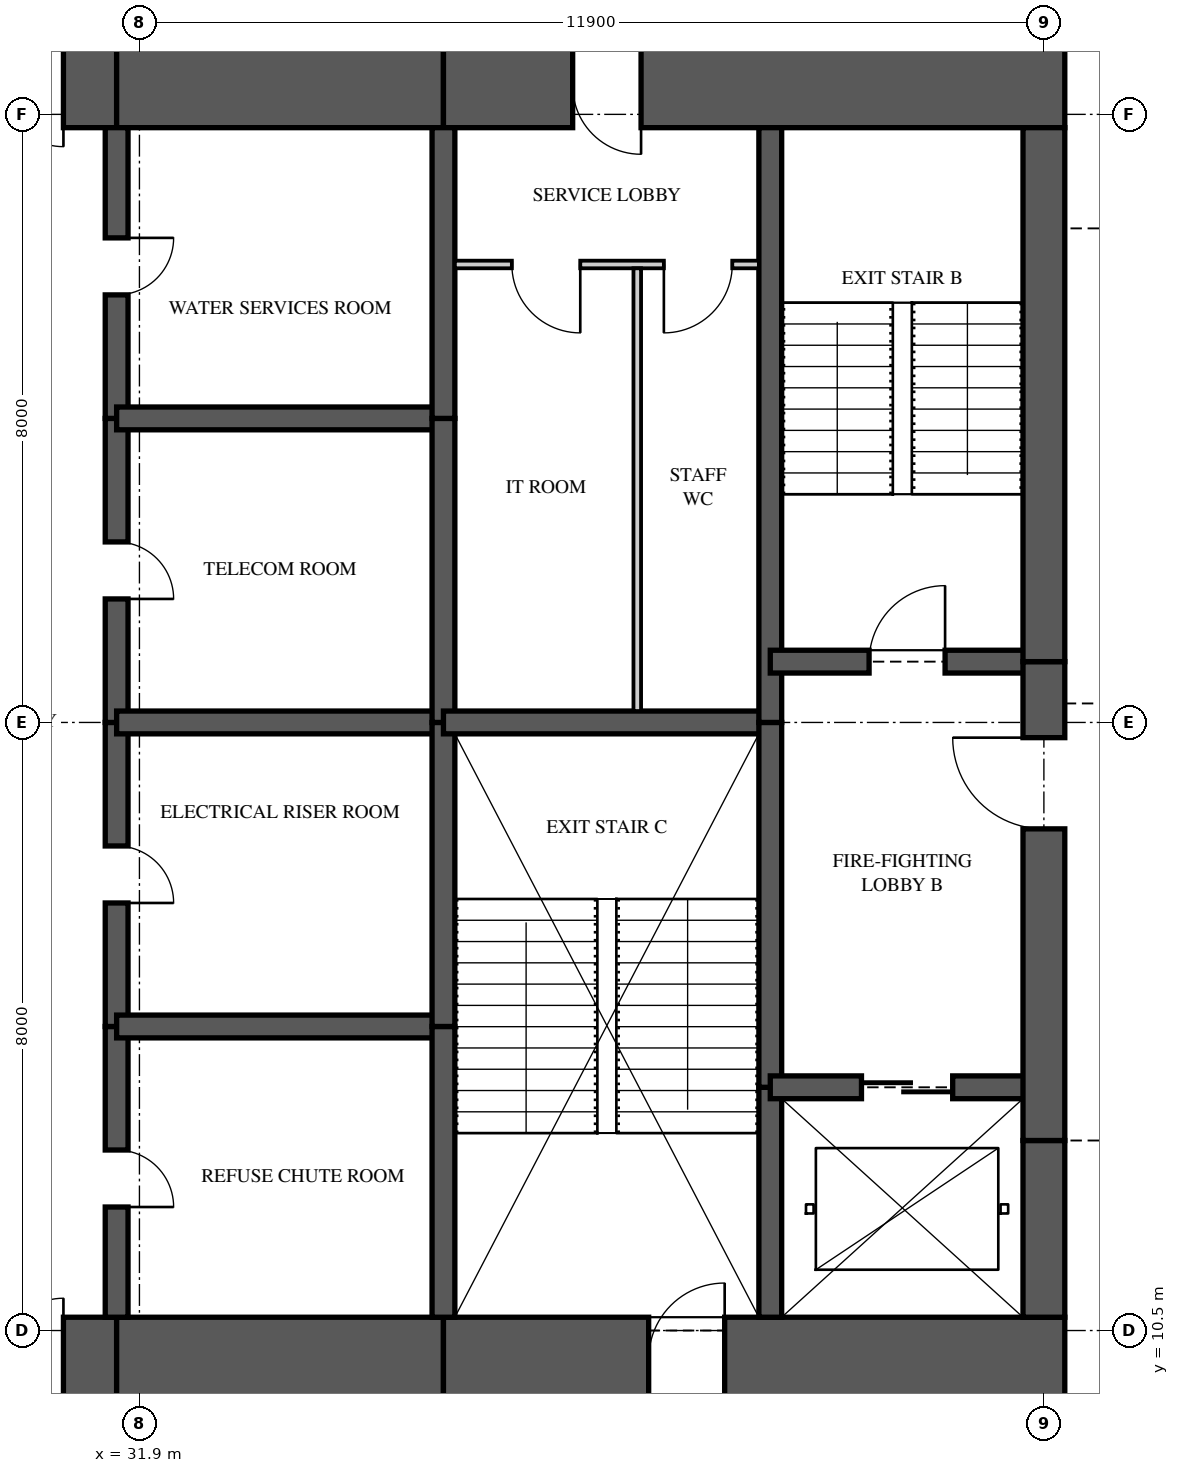
"""IFC4 building model, lengths in metres.
Left out: names, types, materials, properties, quantities, classifications, styles, units other than length and angle.
Written with IfcOpenShell. Run it as: python <this file> out.ifc"""

import sys

from ifc_helpers import new_model, si_unit, direction, frame, frame_2d, origin, place, context, subcontext, project, spatial, rectangle, extrude, element, fill, save


model = new_model("IFC4")
c1 = context("Model", 3, precision=1e-05, world=origin(), true_north=direction((0.0, 1.0)))
c2 = subcontext(c1, "Body", "Model", "MODEL_VIEW")
j1 = project(units=[si_unit("LENGTHUNIT", "METRE"), si_unit("PLANEANGLEUNIT", "RADIAN")], contexts=[c1])
p1 = place(None, origin())
s1 = spatial("IfcSite", under=j1, at=p1, CompositionType="ELEMENT")
p2 = place(p1, origin())
s2 = spatial("IfcBuilding", under=s1, at=p2, CompositionType="ELEMENT")
p3 = place(p2, frame((0.0, 0.0, 252.95)))
s3 = spatial("IfcBuildingStorey", under=s2, at=p3, CompositionType="ELEMENT", Elevation=252.95)
p4 = place(p3, frame((26.0, 10.125, 0.0), z_axis=(0.0, 0.0, 1.0), x_axis=(1.0, 0.0, 0.0)))
e1 = element("IfcWall", 1, at=p4, inside=s3, PredefinedType="SHEAR", context=c2, shape_type="SweptSolid", body=[
    extrude(rectangle(XDim=5.6, YDim=1.1, at=frame_2d((2.8, 0.0))), origin(), (0.0, 0.0, 1.0), 3.5),
])
p5 = place(p4, frame((3.3, 0.0, 0.0)))
e2 = element("IfcOpeningElement", 2, at=p5, cuts=e1, PredefinedType="OPENING", context=c2, shape_type="SweptSolid", body=[
    extrude(rectangle(XDim=1.6, YDim=2.1, at=frame_2d((0.8, 1.05))), frame((0.0, 0.56, 0.0), z_axis=(0.0, -1.0, 0.0), x_axis=(1.0, 0.0, 0.0)), (0.0, 0.0, 1.0), 1.12),
])
p6 = place(p3, frame((31.6, 10.125, 0.0), z_axis=(0.0, 0.0, 1.0), x_axis=(1.0, 0.0, 0.0)))
e3 = element("IfcWall", 3, at=p6, inside=s3, PredefinedType="SHEAR", context=c2, shape_type="SweptSolid", body=[
    extrude(rectangle(XDim=4.3, YDim=1.1, at=frame_2d((2.15, 0.0))), origin(), (0.0, 0.0, 1.0), 3.5),
])
p7 = place(p3, frame((35.9, 10.125, 0.0), z_axis=(0.0, 0.0, 1.0), x_axis=(1.0, 0.0, 0.0)))
e4 = element("IfcWall", 4, at=p7, inside=s3, PredefinedType="SHEAR", context=c2, shape_type="SweptSolid", body=[
    extrude(rectangle(XDim=8.175, YDim=1.1, at=frame_2d((4.087, 0.0))), origin(), (0.0, 0.0, 1.0), 3.5),
])
p8 = place(p7, frame((2.7, 0.0, 0.0)))
e5 = element("IfcOpeningElement", 5, at=p8, cuts=e4, PredefinedType="OPENING", context=c2, shape_type="SweptSolid", body=[
    extrude(rectangle(XDim=1.0, YDim=2.1, at=frame_2d((0.5, 1.05))), frame((0.0, 0.56, 0.0), z_axis=(0.0, -1.0, 0.0), x_axis=(1.0, 0.0, 0.0)), (0.0, 0.0, 1.0), 1.12),
])
p9 = place(p3, frame((44.075, 26.875, 0.0), z_axis=(0.0, 0.0, 1.0), x_axis=(-1.0, 0.0, 0.0)))
e6 = element("IfcWall", 6, at=p9, inside=s3, PredefinedType="SHEAR", context=c2, shape_type="SweptSolid", body=[
    extrude(rectangle(XDim=8.175, YDim=1.1, at=frame_2d((4.087, 0.0))), origin(), (0.0, 0.0, 1.0), 3.5),
])
p10 = place(p9, frame((5.575, 0.0, 0.0)))
e7 = element("IfcOpeningElement", 7, at=p10, cuts=e6, PredefinedType="OPENING", context=c2, shape_type="SweptSolid", body=[
    extrude(rectangle(XDim=0.9, YDim=2.1, at=frame_2d((0.45, 1.05))), frame((0.0, 0.56, 0.0), z_axis=(0.0, -1.0, 0.0), x_axis=(1.0, 0.0, 0.0)), (0.0, 0.0, 1.0), 1.12),
])
p11 = place(p3, frame((35.9, 26.875, 0.0), z_axis=(0.0, 0.0, 1.0), x_axis=(-1.0, 0.0, 0.0)))
e8 = element("IfcWall", 8, at=p11, inside=s3, PredefinedType="SHEAR", context=c2, shape_type="SweptSolid", body=[
    extrude(rectangle(XDim=4.3, YDim=1.1, at=frame_2d((2.15, 0.0))), origin(), (0.0, 0.0, 1.0), 3.5),
])
p12 = place(p3, frame((31.6, 26.875, 0.0), z_axis=(0.0, 0.0, 1.0), x_axis=(-1.0, 0.0, 0.0)))
e9 = element("IfcWall", 9, at=p12, inside=s3, PredefinedType="SHEAR", context=c2, shape_type="SweptSolid", body=[
    extrude(rectangle(XDim=5.6, YDim=1.1, at=frame_2d((2.8, 0.0))), origin(), (0.0, 0.0, 1.0), 3.5),
])
p13 = place(p12, frame((0.7, 0.0, 0.0)))
e10 = element("IfcOpeningElement", 10, at=p13, cuts=e9, PredefinedType="OPENING", context=c2, shape_type="SweptSolid", body=[
    extrude(rectangle(XDim=1.6, YDim=2.1, at=frame_2d((0.8, 1.05))), frame((0.0, 0.56, 0.0), z_axis=(0.0, -1.0, 0.0), x_axis=(1.0, 0.0, 0.0)), (0.0, 0.0, 1.0), 1.12),
])
p14 = place(p3, frame((43.8, 10.675, 0.0), z_axis=(0.0, 0.0, 1.0), x_axis=(0.0, 1.0, 0.0)))
e11 = element("IfcWall", 11, at=p14, inside=s3, PredefinedType="SHEAR", context=c2, shape_type="SweptSolid", body=[
    extrude(rectangle(XDim=2.325, YDim=0.55, at=frame_2d((1.163, 0.0))), origin(), (0.0, 0.0, 1.0), 3.5),
])
p15 = place(p3, frame((43.8, 13.0, 0.0), z_axis=(0.0, 0.0, 1.0), x_axis=(0.0, 1.0, 0.0)))
e12 = element("IfcWall", 12, at=p15, inside=s3, PredefinedType="SHEAR", context=c2, shape_type="SweptSolid", body=[
    extrude(rectangle(XDim=6.3, YDim=0.55, at=frame_2d((3.15, 0.0))), origin(), (0.0, 0.0, 1.0), 3.5),
])
p16 = place(p15, frame((4.1, 0.0, 0.0)))
e13 = element("IfcOpeningElement", 13, at=p16, cuts=e12, PredefinedType="OPENING", context=c2, shape_type="SweptSolid", body=[
    extrude(rectangle(XDim=1.2, YDim=2.2, at=frame_2d((0.6, 1.1))), frame((0.0, 0.285, 0.0), z_axis=(0.0, -1.0, 0.0), x_axis=(1.0, 0.0, 0.0)), (0.0, 0.0, 1.0), 0.57),
])
p17 = place(p3, frame((43.8, 19.3, 0.0), z_axis=(0.0, 0.0, 1.0), x_axis=(0.0, 1.0, 0.0)))
e14 = element("IfcWall", 14, at=p17, inside=s3, PredefinedType="SHEAR", context=c2, shape_type="SweptSolid", body=[
    extrude(rectangle(XDim=7.025, YDim=0.55, at=frame_2d((3.512, 0.0))), origin(), (0.0, 0.0, 1.0), 3.5),
])
p18 = place(p3, frame((31.6, 10.675, 0.0), z_axis=(0.0, 0.0, 1.0), x_axis=(0.0, 1.0, 0.0)))
e15 = element("IfcWall", 15, at=p18, inside=s3, PredefinedType="SHEAR", context=c2, shape_type="SweptSolid", body=[
    extrude(rectangle(XDim=3.825, YDim=0.3, at=frame_2d((1.913, 0.0))), origin(), (0.0, 0.0, 1.0), 3.5),
])
p19 = place(p18, frame((1.45, 0.0, 0.0)))
e16 = element("IfcOpeningElement", 16, at=p19, cuts=e15, PredefinedType="OPENING", context=c2, shape_type="SweptSolid", body=[
    extrude(rectangle(XDim=0.75, YDim=2.1, at=frame_2d((0.375, 1.05))), frame((0.0, 0.16, 0.0), z_axis=(0.0, -1.0, 0.0), x_axis=(1.0, 0.0, 0.0)), (0.0, 0.0, 1.0), 0.32),
])
p20 = place(p3, frame((31.6, 14.5, 0.0), z_axis=(0.0, 0.0, 1.0), x_axis=(0.0, 1.0, 0.0)))
e17 = element("IfcWall", 17, at=p20, inside=s3, PredefinedType="SHEAR", context=c2, shape_type="SweptSolid", body=[
    extrude(rectangle(XDim=4.0, YDim=0.3, at=frame_2d((2.0, 0.0))), origin(), (0.0, 0.0, 1.0), 3.5),
])
p21 = place(p20, frame((1.625, 0.0, 0.0)))
e18 = element("IfcOpeningElement", 18, at=p21, cuts=e17, PredefinedType="OPENING", context=c2, shape_type="SweptSolid", body=[
    extrude(rectangle(XDim=0.75, YDim=2.1, at=frame_2d((0.375, 1.05))), frame((0.0, 0.16, 0.0), z_axis=(0.0, -1.0, 0.0), x_axis=(1.0, 0.0, 0.0)), (0.0, 0.0, 1.0), 0.32),
])
p22 = place(p3, frame((31.6, 18.5, 0.0), z_axis=(0.0, 0.0, 1.0), x_axis=(0.0, 1.0, 0.0)))
e19 = element("IfcWall", 19, at=p22, inside=s3, PredefinedType="SHEAR", context=c2, shape_type="SweptSolid", body=[
    extrude(rectangle(XDim=4.0, YDim=0.3, at=frame_2d((2.0, 0.0))), origin(), (0.0, 0.0, 1.0), 3.5),
])
p23 = place(p22, frame((1.625, 0.0, 0.0)))
e20 = element("IfcOpeningElement", 20, at=p23, cuts=e19, PredefinedType="OPENING", context=c2, shape_type="SweptSolid", body=[
    extrude(rectangle(XDim=0.75, YDim=2.1, at=frame_2d((0.375, 1.05))), frame((0.0, 0.16, 0.0), z_axis=(0.0, -1.0, 0.0), x_axis=(1.0, 0.0, 0.0)), (0.0, 0.0, 1.0), 0.32),
])
p24 = place(p3, frame((31.6, 22.5, 0.0), z_axis=(0.0, 0.0, 1.0), x_axis=(0.0, 1.0, 0.0)))
e21 = element("IfcWall", 21, at=p24, inside=s3, PredefinedType="SHEAR", context=c2, shape_type="SweptSolid", body=[
    extrude(rectangle(XDim=3.825, YDim=0.3, at=frame_2d((1.913, 0.0))), origin(), (0.0, 0.0, 1.0), 3.5),
])
p25 = place(p24, frame((1.625, 0.0, 0.0)))
e22 = element("IfcOpeningElement", 22, at=p25, cuts=e21, PredefinedType="OPENING", context=c2, shape_type="SweptSolid", body=[
    extrude(rectangle(XDim=0.75, YDim=2.1, at=frame_2d((0.375, 1.05))), frame((0.0, 0.16, 0.0), z_axis=(0.0, -1.0, 0.0), x_axis=(1.0, 0.0, 0.0)), (0.0, 0.0, 1.0), 0.32),
])
p26 = place(p3, frame((35.9, 10.675, 0.0), z_axis=(0.0, 0.0, 1.0), x_axis=(0.0, 1.0, 0.0)))
e23 = element("IfcWall", 23, at=p26, inside=s3, PredefinedType="SHEAR", context=c2, shape_type="SweptSolid", body=[
    extrude(rectangle(XDim=3.825, YDim=0.3, at=frame_2d((1.913, 0.0))), origin(), (0.0, 0.0, 1.0), 3.5),
])
for number, where, z_axis, x_axis in (
    (24, (35.9, 14.5, 0.0), (0.0, 0.0, 1.0), (0.0, 1.0, 0.0)),
    (25, (35.9, 18.5, 0.0), (0.0, 0.0, 1.0), (0.0, 1.0, 0.0)),
):
    element("IfcWall", number, at=place(p3, frame(where, z_axis=z_axis, x_axis=x_axis)), inside=s3, PredefinedType="SHEAR", context=c2, shape_type="SweptSolid", body=[
        extrude(rectangle(XDim=4.0, YDim=0.3, at=frame_2d((2.0, 0.0))), origin(), (0.0, 0.0, 1.0), 3.5),
    ])
p27 = place(p3, frame((35.9, 22.5, 0.0), z_axis=(0.0, 0.0, 1.0), x_axis=(0.0, 1.0, 0.0)))
e26 = element("IfcWall", 26, at=p27, inside=s3, PredefinedType="SHEAR", context=c2, shape_type="SweptSolid", body=[
    extrude(rectangle(XDim=3.825, YDim=0.3, at=frame_2d((1.913, 0.0))), origin(), (0.0, 0.0, 1.0), 3.5),
])
p28 = place(p3, frame((40.2, 10.675, 0.0), z_axis=(0.0, 0.0, 1.0), x_axis=(0.0, 1.0, 0.0)))
e27 = element("IfcWall", 27, at=p28, inside=s3, PredefinedType="SHEAR", context=c2, shape_type="SweptSolid", body=[
    extrude(rectangle(XDim=3.025, YDim=0.3, at=frame_2d((1.512, 0.0))), origin(), (0.0, 0.0, 1.0), 3.5),
])
p29 = place(p3, frame((40.2, 13.7, 0.0), z_axis=(0.0, 0.0, 1.0), x_axis=(0.0, 1.0, 0.0)))
e28 = element("IfcWall", 28, at=p29, inside=s3, PredefinedType="SHEAR", context=c2, shape_type="SweptSolid", body=[
    extrude(rectangle(XDim=4.8, YDim=0.3, at=frame_2d((2.4, 0.0))), origin(), (0.0, 0.0, 1.0), 3.5),
])
p30 = place(p3, frame((40.2, 18.5, 0.0), z_axis=(0.0, 0.0, 1.0), x_axis=(0.0, 1.0, 0.0)))
e29 = element("IfcWall", 29, at=p30, inside=s3, PredefinedType="SHEAR", context=c2, shape_type="SweptSolid", body=[
    extrude(rectangle(XDim=7.825, YDim=0.3, at=frame_2d((3.913, 0.0))), origin(), (0.0, 0.0, 1.0), 3.5),
])
for number, where, z_axis, x_axis in (
    (30, (31.6, 14.5, 0.0), (0.0, 0.0, 1.0), (1.0, 0.0, 0.0)),
    (31, (31.6, 18.5, 0.0), (0.0, 0.0, 1.0), (1.0, 0.0, 0.0)),
    (32, (31.6, 22.5, 0.0), (0.0, 0.0, 1.0), (1.0, 0.0, 0.0)),
):
    element("IfcWall", number, at=place(p3, frame(where, z_axis=z_axis, x_axis=x_axis)), inside=s3, PredefinedType="SHEAR", context=c2, shape_type="SweptSolid", body=[
        extrude(rectangle(XDim=4.3, YDim=0.3, at=frame_2d((2.15, 0.0))), origin(), (0.0, 0.0, 1.0), 3.5),
    ])
p31 = place(p3, frame((35.9, 18.5, 0.0), z_axis=(0.0, 0.0, 1.0), x_axis=(1.0, 0.0, 0.0)))
e33 = element("IfcWall", 33, at=p31, inside=s3, PredefinedType="SHEAR", context=c2, shape_type="SweptSolid", body=[
    extrude(rectangle(XDim=4.3, YDim=0.3, at=frame_2d((2.15, 0.0))), origin(), (0.0, 0.0, 1.0), 3.5),
])
p32 = place(p3, frame((40.2, 13.7, 0.0), z_axis=(0.0, 0.0, 1.0), x_axis=(1.0, 0.0, 0.0)))
e34 = element("IfcWall", 34, at=p32, inside=s3, PredefinedType="SHEAR", context=c2, shape_type="SweptSolid", body=[
    extrude(rectangle(XDim=3.6, YDim=0.3, at=frame_2d((1.8, 0.0))), origin(), (0.0, 0.0, 1.0), 3.5),
])
p33 = place(p32, frame((1.2, 0.0, 0.0)))
e35 = element("IfcOpeningElement", 35, at=p33, cuts=e34, PredefinedType="OPENING", context=c2, shape_type="SweptSolid", body=[
    extrude(rectangle(XDim=1.2, YDim=2.1, at=frame_2d((0.6, 1.05))), frame((0.0, 0.16, 0.0), z_axis=(0.0, -1.0, 0.0), x_axis=(1.0, 0.0, 0.0)), (0.0, 0.0, 1.0), 0.32),
])
p34 = place(p3, frame((40.2, 19.3, 0.0), z_axis=(0.0, 0.0, 1.0), x_axis=(1.0, 0.0, 0.0)))
e36 = element("IfcWall", 36, at=p34, inside=s3, PredefinedType="SHEAR", context=c2, shape_type="SweptSolid", body=[
    extrude(rectangle(XDim=3.6, YDim=0.3, at=frame_2d((1.8, 0.0))), origin(), (0.0, 0.0, 1.0), 3.5),
])
p35 = place(p34, frame((1.3, 0.0, 0.0)))
e37 = element("IfcOpeningElement", 37, at=p35, cuts=e36, PredefinedType="OPENING", context=c2, shape_type="SweptSolid", body=[
    extrude(rectangle(XDim=1.0, YDim=2.1, at=frame_2d((0.5, 1.05))), frame((0.0, 0.16, 0.0), z_axis=(0.0, -1.0, 0.0), x_axis=(1.0, 0.0, 0.0)), (0.0, 0.0, 1.0), 0.32),
])
p36 = place(p3, frame((36.05, 24.525, 0.0), z_axis=(0.0, 0.0, 1.0), x_axis=(1.0, 0.0, 0.0)))
e38 = element("IfcWall", 38, at=p36, inside=s3, PredefinedType="PARTITIONING", context=c2, shape_type="SweptSolid", body=[
    extrude(rectangle(XDim=4.0, YDim=0.1, at=frame_2d((2.0, 0.0))), origin(), (0.0, 0.0, 1.0), 3.26),
])
p37 = place(p36, frame((0.75, 0.0, 0.0)))
e39 = element("IfcOpeningElement", 39, at=p37, cuts=e38, PredefinedType="OPENING", context=c2, shape_type="SweptSolid", body=[
    extrude(rectangle(XDim=0.9, YDim=2.1, at=frame_2d((0.45, 1.05))), frame((0.0, 0.06, 0.0), z_axis=(0.0, -1.0, 0.0), x_axis=(1.0, 0.0, 0.0)), (0.0, 0.0, 1.0), 0.12),
])
p38 = place(p36, frame((2.75, 0.0, 0.0)))
e40 = element("IfcOpeningElement", 40, at=p38, cuts=e38, PredefinedType="OPENING", context=c2, shape_type="SweptSolid", body=[
    extrude(rectangle(XDim=0.9, YDim=2.1, at=frame_2d((0.45, 1.05))), frame((0.0, 0.06, 0.0), z_axis=(0.0, -1.0, 0.0), x_axis=(1.0, 0.0, 0.0)), (0.0, 0.0, 1.0), 0.12),
])
p39 = place(p3, frame((38.45, 18.65, 0.0), z_axis=(0.0, 0.0, 1.0), x_axis=(0.0, 1.0, 0.0)))
e41 = element("IfcWall", 41, at=p39, inside=s3, PredefinedType="PARTITIONING", context=c2, shape_type="SweptSolid", body=[
    extrude(rectangle(XDim=5.825, YDim=0.1, at=frame_2d((2.913, 0.0))), origin(), (0.0, 0.0, 1.0), 3.26),
])
p40 = place(p37, frame((0.9, 0.0, 0.0), z_axis=(0.0, 0.0, 1.0), x_axis=(-1.0, 0.0, 0.0)))
e42 = element("IfcDoor", 42, at=p40, inside=s3, OperationType="SINGLE_SWING_LEFT", PredefinedType="DOOR", context=c2, shape_type="SweptSolid", body=[
    extrude(rectangle(XDim=0.9, YDim=2.1, at=frame_2d((0.45, 1.05))), frame((0.0, 0.025, 0.0), z_axis=(0.0, -1.0, 0.0), x_axis=(1.0, 0.0, 0.0)), (0.0, 0.0, 1.0), 0.05),
])
fill(e39, e42)
p41 = place(p38, frame((0.9, 0.0, 0.0), z_axis=(0.0, 0.0, 1.0), x_axis=(-1.0, 0.0, 0.0)))
e43 = element("IfcDoor", 43, at=p41, inside=s3, OperationType="SINGLE_SWING_RIGHT", PredefinedType="DOOR", context=c2, shape_type="SweptSolid", body=[
    extrude(rectangle(XDim=0.9, YDim=2.1, at=frame_2d((0.45, 1.05))), frame((0.0, 0.025, 0.0), z_axis=(0.0, -1.0, 0.0), x_axis=(1.0, 0.0, 0.0)), (0.0, 0.0, 1.0), 0.05),
])
fill(e40, e43)
p42 = place(p35, origin())
e44 = element("IfcDoor", 44, at=p42, inside=s3, OperationType="SINGLE_SWING_RIGHT", PredefinedType="DOOR", context=c2, shape_type="SweptSolid", body=[
    extrude(rectangle(XDim=1.0, YDim=2.1, at=frame_2d((0.5, 1.05))), frame((0.0, 0.025, 0.0), z_axis=(0.0, -1.0, 0.0), x_axis=(1.0, 0.0, 0.0)), (0.0, 0.0, 1.0), 0.05),
])
fill(e37, e44)
p43 = place(p16, origin())
e45 = element("IfcDoor", 45, at=p43, inside=s3, OperationType="SINGLE_SWING_RIGHT", PredefinedType="DOOR", context=c2, shape_type="SweptSolid", body=[
    extrude(rectangle(XDim=1.2, YDim=2.2, at=frame_2d((0.6, 1.1))), frame((0.0, 0.025, 0.0), z_axis=(0.0, -1.0, 0.0), x_axis=(1.0, 0.0, 0.0)), (0.0, 0.0, 1.0), 0.05),
])
fill(e13, e45)
p44 = place(p33, origin())
e46 = element("IfcDoor", 46, at=p44, inside=s3, OperationType="SLIDING_TO_LEFT", PredefinedType="DOOR", context=c2, shape_type="SweptSolid", body=[
    extrude(rectangle(XDim=1.2, YDim=2.1, at=frame_2d((0.6, 1.05))), frame((0.0, 0.025, 0.0), z_axis=(0.0, -1.0, 0.0), x_axis=(1.0, 0.0, 0.0)), (0.0, 0.0, 1.0), 0.05),
])
fill(e35, e46)
p45 = place(p5, origin())
e47 = element("IfcDoor", 47, at=p45, inside=s3, OperationType="DOUBLE_DOOR_SINGLE_SWING", PredefinedType="DOOR", context=c2, shape_type="SweptSolid", body=[
    extrude(rectangle(XDim=1.6, YDim=2.1, at=frame_2d((0.8, 1.05))), frame((0.0, 0.025, 0.0), z_axis=(0.0, -1.0, 0.0), x_axis=(1.0, 0.0, 0.0)), (0.0, 0.0, 1.0), 0.05),
])
fill(e2, e47)
p46 = place(p13, origin())
e48 = element("IfcDoor", 48, at=p46, inside=s3, OperationType="DOUBLE_DOOR_SINGLE_SWING", PredefinedType="DOOR", context=c2, shape_type="SweptSolid", body=[
    extrude(rectangle(XDim=1.6, YDim=2.1, at=frame_2d((0.8, 1.05))), frame((0.0, 0.025, 0.0), z_axis=(0.0, -1.0, 0.0), x_axis=(1.0, 0.0, 0.0)), (0.0, 0.0, 1.0), 0.05),
])
fill(e10, e48)
p47 = place(p19, frame((0.75, 0.0, 0.0), z_axis=(0.0, 0.0, 1.0), x_axis=(-1.0, 0.0, 0.0)))
e49 = element("IfcDoor", 49, at=p47, inside=s3, OperationType="SINGLE_SWING_RIGHT", PredefinedType="DOOR", context=c2, shape_type="SweptSolid", body=[
    extrude(rectangle(XDim=0.75, YDim=2.1, at=frame_2d((0.375, 1.05))), frame((0.0, 0.025, 0.0), z_axis=(0.0, -1.0, 0.0), x_axis=(1.0, 0.0, 0.0)), (0.0, 0.0, 1.0), 0.05),
])
fill(e16, e49)
p48 = place(p21, frame((0.75, 0.0, 0.0), z_axis=(0.0, 0.0, 1.0), x_axis=(-1.0, 0.0, 0.0)))
e50 = element("IfcDoor", 50, at=p48, inside=s3, OperationType="SINGLE_SWING_RIGHT", PredefinedType="DOOR", context=c2, shape_type="SweptSolid", body=[
    extrude(rectangle(XDim=0.75, YDim=2.1, at=frame_2d((0.375, 1.05))), frame((0.0, 0.025, 0.0), z_axis=(0.0, -1.0, 0.0), x_axis=(1.0, 0.0, 0.0)), (0.0, 0.0, 1.0), 0.05),
])
fill(e18, e50)
p49 = place(p23, frame((0.75, 0.0, 0.0), z_axis=(0.0, 0.0, 1.0), x_axis=(-1.0, 0.0, 0.0)))
e51 = element("IfcDoor", 51, at=p49, inside=s3, OperationType="SINGLE_SWING_RIGHT", PredefinedType="DOOR", context=c2, shape_type="SweptSolid", body=[
    extrude(rectangle(XDim=0.75, YDim=2.1, at=frame_2d((0.375, 1.05))), frame((0.0, 0.025, 0.0), z_axis=(0.0, -1.0, 0.0), x_axis=(1.0, 0.0, 0.0)), (0.0, 0.0, 1.0), 0.05),
])
fill(e20, e51)
p50 = place(p25, frame((0.75, 0.0, 0.0), z_axis=(0.0, 0.0, 1.0), x_axis=(-1.0, 0.0, 0.0)))
e52 = element("IfcDoor", 52, at=p50, inside=s3, OperationType="SINGLE_SWING_LEFT", PredefinedType="DOOR", context=c2, shape_type="SweptSolid", body=[
    extrude(rectangle(XDim=0.75, YDim=2.1, at=frame_2d((0.375, 1.05))), frame((0.0, 0.025, 0.0), z_axis=(0.0, -1.0, 0.0), x_axis=(1.0, 0.0, 0.0)), (0.0, 0.0, 1.0), 0.05),
])
fill(e22, e52)
p51 = place(p8, origin())
e53 = element("IfcDoor", 53, at=p51, inside=s3, OperationType="SINGLE_SWING_RIGHT", PredefinedType="DOOR", context=c2, shape_type="SweptSolid", body=[
    extrude(rectangle(XDim=1.0, YDim=2.1, at=frame_2d((0.5, 1.05))), frame((0.0, 0.025, 0.0), z_axis=(0.0, -1.0, 0.0), x_axis=(1.0, 0.0, 0.0)), (0.0, 0.0, 1.0), 0.05),
])
fill(e5, e53)
p52 = place(p10, origin())
e54 = element("IfcDoor", 54, at=p52, inside=s3, OperationType="SINGLE_SWING_LEFT", PredefinedType="DOOR", context=c2, shape_type="SweptSolid", body=[
    extrude(rectangle(XDim=0.9, YDim=2.1, at=frame_2d((0.45, 1.05))), frame((0.0, 0.47, 0.0), z_axis=(0.0, -1.0, 0.0), x_axis=(1.0, 0.0, 0.0)), (0.0, 0.0, 1.0), 0.8),
])
fill(e7, e54)
save(model, sys.argv[1])
